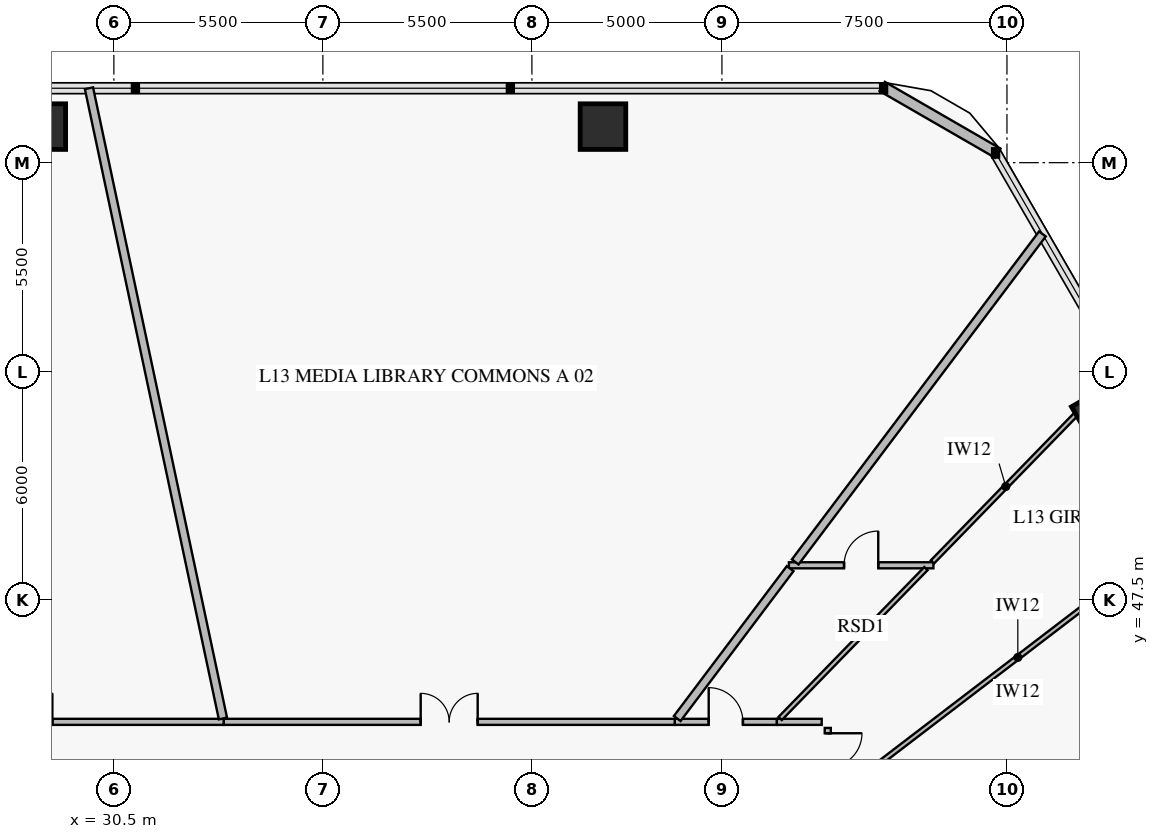
"""IFC4 building model, lengths in metres.
Left out: names, types, materials, properties, quantities, classifications, styles, units other than length and angle.
Written with IfcOpenShell. Run it as: python <this file> out.ifc"""

import sys

from ifc_helpers import new_model, si_unit, direction, frame, frame_2d, origin, origin_2d, place, context, subcontext, project, spatial, rectangle, extrude, element, fill, save


model = new_model("IFC4")
c1 = context("Model", 3, precision=1e-05, world=origin(), true_north=direction((0.0, 1.0)))
c2 = subcontext(c1, "Body", "Model", "MODEL_VIEW")
j1 = project(units=[si_unit("LENGTHUNIT", "METRE"), si_unit("PLANEANGLEUNIT", "RADIAN")], contexts=[c1])
p1 = place(None, origin())
s1 = spatial("IfcSite", under=j1, at=p1, CompositionType="ELEMENT")
p2 = place(p1, origin())
s2 = spatial("IfcBuilding", under=s1, at=p2, CompositionType="ELEMENT")
p3 = place(p2, frame((0.0, 0.0, 54.0)))
s3 = spatial("IfcBuildingStorey", under=s2, at=p3, CompositionType="ELEMENT", Elevation=54.0)
for number, where, z_axis, x_axis in (
    (1, (56.519, 52.357, 0.0), (0.0, 0.0, 1.0), (-0.5, 0.866, 0.0)),
    (2, (43.37, 59.948, 0.0), (0.0, 0.0, 1.0), (-1.0, 0.0, 0.0)),
    (3, (28.63, 59.948, 0.0), (0.0, 0.0, 1.0), (-1.0, 0.0, 0.0)),
):
    element("IfcColumn", number, at=place(p3, frame(where, z_axis=z_axis, x_axis=x_axis)), inside=s3, PredefinedType="COLUMN", context=c2, shape_type="SweptSolid", body=[
        extrude(rectangle(XDim=1.2, YDim=1.2, at=origin_2d()), origin(), (0.0, 0.0, 1.0), 3.92),
    ])
p4 = place(p3, frame((50.717, 61.006, 0.0), z_axis=(0.0, 0.0, 1.0), x_axis=(0.866007452331, -0.500031091541, 0.0)))
e4 = element("IfcWall", 4, at=p4, inside=s3, PredefinedType="SOLIDWALL", context=c2, shape_type="SweptSolid", body=[
    extrude(rectangle(XDim=3.515, YDim=0.28, at=frame_2d((1.757, 0.0))), origin(), (0.0, 0.0, 1.0), 3.92),
])
p5 = place(p3, frame((49.285, 42.157, 0.0), z_axis=(0.0, 0.0, 1.0), x_axis=(0.0, 1.0, 0.0)))
e5 = element("IfcWall", 5, at=p5, inside=s3, PredefinedType="PARTITIONING", context=c2, shape_type="SweptSolid", body=[
    extrude(rectangle(XDim=1.968, YDim=0.16, at=frame_2d((0.984, 0.0))), origin(), (0.0, 0.0, 1.0), 3.92),
])
p6 = place(p5, frame((0.928, 0.0, 0.0)))
e6 = element("IfcOpeningElement", 6, at=p6, cuts=e5, PredefinedType="OPENING", context=c2, shape_type="SweptSolid", body=[
    extrude(rectangle(XDim=0.9, YDim=2.1, at=frame_2d((0.45, 1.05))), frame((0.0, 0.092, 0.0), z_axis=(0.0, -1.0, 0.0), x_axis=(1.0, 0.0, 0.0)), (0.0, 0.0, 1.0), 0.184),
])
p7 = place(p3, frame((48.262, 48.405, 0.0), z_axis=(0.0, 0.0, 1.0), x_axis=(1.0, 0.0, 0.0)))
e7 = element("IfcWall", 7, at=p7, inside=s3, PredefinedType="PARTITIONING", context=c2, shape_type="SweptSolid", body=[
    extrude(rectangle(XDim=3.803, YDim=0.16, at=frame_2d((1.901, 0.0))), origin(), (0.0, 0.0, 1.0), 3.47),
])
p8 = place(p7, frame((1.451, 0.0, 0.0)))
e8 = element("IfcOpeningElement", 8, at=p8, cuts=e7, PredefinedType="OPENING", context=c2, shape_type="SweptSolid", body=[
    extrude(rectangle(XDim=0.9, YDim=2.1, at=frame_2d((0.45, 1.05))), frame((0.0, 0.092, 0.0), z_axis=(0.0, -1.0, 0.0), x_axis=(1.0, 0.0, 0.0)), (0.0, 0.0, 1.0), 0.184),
])
p9 = place(p3, frame((47.947, 44.285, 0.0), z_axis=(0.0, 0.0, 1.0), x_axis=(-1.0, 0.0, 0.0)))
e9 = element("IfcWall", 9, at=p9, inside=s3, PredefinedType="PARTITIONING", context=c2, shape_type="SweptSolid", body=[
    extrude(rectangle(XDim=2.689, YDim=0.16, at=frame_2d((1.345, 0.0))), origin(), (0.0, 0.0, 1.0), 3.92),
])
p10 = place(p9, frame((0.895, 0.0, 0.0)))
e10 = element("IfcOpeningElement", 10, at=p10, cuts=e9, PredefinedType="OPENING", context=c2, shape_type="SweptSolid", body=[
    extrude(rectangle(XDim=0.9, YDim=2.1, at=frame_2d((0.45, 1.05))), frame((0.0, 0.092, 0.0), z_axis=(0.0, -1.0, 0.0), x_axis=(1.0, 0.0, 0.0)), (0.0, 0.0, 1.0), 0.184),
])
p11 = place(p3, frame((45.257, 44.285, 0.0), z_axis=(0.0, 0.0, 1.0), x_axis=(-1.0, 0.0, 0.0)))
e11 = element("IfcWall", 11, at=p11, inside=s3, PredefinedType="PARTITIONING", context=c2, shape_type="SweptSolid", body=[
    extrude(rectangle(XDim=11.869, YDim=0.16, at=frame_2d((5.934, 0.0))), origin(), (0.0, 0.0, 1.0), 3.22),
])
p12 = place(p11, frame((5.184, 0.0, 0.0)))
e12 = element("IfcOpeningElement", 12, at=p12, cuts=e11, PredefinedType="OPENING", context=c2, shape_type="SweptSolid", body=[
    extrude(rectangle(XDim=1.5, YDim=2.15, at=frame_2d((0.75, 1.075))), frame((0.0, 0.092, 0.0), z_axis=(0.0, -1.0, 0.0), x_axis=(1.0, 0.0, 0.0)), (0.0, 0.0, 1.0), 0.184),
])
p13 = place(p3, frame((33.389, 44.285, 0.0), z_axis=(0.0, 0.0, 1.0), x_axis=(-1.0, 0.0, 0.0)))
e13 = element("IfcWall", 13, at=p13, inside=s3, PredefinedType="PARTITIONING", context=c2, shape_type="SweptSolid", body=[
    extrude(rectangle(XDim=10.514, YDim=0.16, at=frame_2d((5.257, 0.0))), origin(), (0.0, 0.0, 1.0), 3.22),
])
p14 = place(p13, frame((4.507, 0.0, 0.0)))
e14 = element("IfcOpeningElement", 14, at=p14, cuts=e13, PredefinedType="OPENING", context=c2, shape_type="SweptSolid", body=[
    extrude(rectangle(XDim=1.5, YDim=2.15, at=frame_2d((0.75, 1.075))), frame((0.0, 0.092, 0.0), z_axis=(0.0, -1.0, 0.0), x_axis=(1.0, 0.0, 0.0)), (0.0, 0.0, 1.0), 0.184),
])
p15 = place(p3, frame((49.373, 39.413, 0.0), z_axis=(0.0, 0.0, 1.0), x_axis=(0.874620963666, 0.484807353405, 0.0)))
e15 = element("IfcWall", 15, at=p15, inside=s3, PredefinedType="PARTITIONING", context=c2, shape_type="SweptSolid", body=[
    extrude(rectangle(XDim=13.673, YDim=0.22, at=frame_2d((6.836, 0.0))), origin(), (0.0, 0.0, 1.0), 3.17),
])
p16 = place(p3, frame((49.373, 42.225, 0.0), z_axis=(0.0, 0.0, 1.0), x_axis=(0.794422824401, 0.607365109362, 0.0)))
e16 = element("IfcWall", 16, at=p16, inside=s3, PredefinedType="PARTITIONING", context=c2, shape_type="SweptSolid", body=[
    extrude(rectangle(XDim=12.368, YDim=0.12, at=frame_2d((6.184, 0.0))), origin(), (0.0, 0.0, 1.0), 3.17),
])
p17 = place(p3, frame((49.125, 44.285, 0.0), z_axis=(0.0, 0.0, 1.0), x_axis=(-1.0, 0.0, 0.0)))
e17 = element("IfcWall", 17, at=p17, inside=s3, PredefinedType="PARTITIONING", context=c2, shape_type="SweptSolid", body=[
    extrude(rectangle(XDim=1.178, YDim=0.16, at=frame_2d((0.589, 0.0))), origin(), (0.0, 0.0, 1.0), 3.22),
])
p18 = place(p3, frame((48.032, 44.373, 0.0), z_axis=(0.0, 0.0, 1.0), x_axis=(0.697186119011, 0.716890169732, 0.0)))
e18 = element("IfcWall", 18, at=p18, inside=s3, PredefinedType="PARTITIONING", context=c2, shape_type="SweptSolid", body=[
    extrude(rectangle(XDim=5.501, YDim=0.12, at=frame_2d((2.75, 0.0))), origin(), (0.0, 0.0, 1.0), 3.47),
])
p19 = place(p3, frame((52.039, 48.493, 0.0), z_axis=(0.0, 0.0, 1.0), x_axis=(0.697138835877, 0.716936150234, 0.0)))
e19 = element("IfcWall", 19, at=p19, inside=s3, PredefinedType="PARTITIONING", context=c2, shape_type="SweptSolid", body=[
    extrude(rectangle(XDim=5.537, YDim=0.12, at=frame_2d((2.769, 0.0))), origin(), (0.0, 0.0, 1.0), 3.92),
])
p20 = place(p3, frame((45.324, 44.373, 0.0), z_axis=(0.0, 0.0, 1.0), x_axis=(0.601817794095, 0.798633421984, 0.0)))
e20 = element("IfcWall", 20, at=p20, inside=s3, PredefinedType="PARTITIONING", context=c2, shape_type="SweptSolid", body=[
    extrude(rectangle(XDim=4.938, YDim=0.22, at=frame_2d((2.469, 0.0))), origin(), (0.0, 0.0, 1.0), 3.92),
])
p21 = place(p3, frame((48.428, 48.493, 0.0), z_axis=(0.0, 0.0, 1.0), x_axis=(0.601802006389, 0.798645318715, 0.0)))
e21 = element("IfcWall", 21, at=p21, inside=s3, PredefinedType="PARTITIONING", context=c2, shape_type="SweptSolid", body=[
    extrude(rectangle(XDim=10.808, YDim=0.22, at=frame_2d((5.404, 0.0))), origin(), (0.0, 0.0, 1.0), 3.17),
])
p22 = place(p3, frame((33.37, 44.373, 0.0), z_axis=(0.0, 0.0, 1.0), x_axis=(-0.207914205497, 0.978147066219, 0.0)))
e22 = element("IfcWall", 22, at=p22, inside=s3, PredefinedType="PARTITIONING", context=c2, shape_type="SweptSolid", body=[
    extrude(rectangle(XDim=16.956, YDim=0.22, at=frame_2d((8.478, 0.0))), origin(), (0.0, 0.0, 1.0), 3.17),
])
p23 = place(p6, frame((0.9, 0.0, 0.0), z_axis=(0.0, 0.0, 1.0), x_axis=(-1.0, 0.0, 0.0)))
e23 = element("IfcDoor", 23, at=p23, inside=s3, OperationType="SINGLE_SWING_LEFT", PredefinedType="DOOR", context=c2, shape_type="SweptSolid", body=[
    extrude(rectangle(XDim=0.9, YDim=2.1, at=frame_2d((0.45, 1.05))), frame((0.0, 0.025, 0.0), z_axis=(0.0, -1.0, 0.0), x_axis=(1.0, 0.0, 0.0)), (0.0, 0.0, 1.0), 0.05),
])
fill(e6, e23)
p24 = place(p8, origin())
e24 = element("IfcDoor", 24, at=p24, inside=s3, OperationType="SINGLE_SWING_RIGHT", PredefinedType="DOOR", context=c2, shape_type="SweptSolid", body=[
    extrude(rectangle(XDim=0.9, YDim=2.1, at=frame_2d((0.45, 1.05))), frame((0.0, 0.025, 0.0), z_axis=(0.0, -1.0, 0.0), x_axis=(1.0, 0.0, 0.0)), (0.0, 0.0, 1.0), 0.05),
])
fill(e8, e24)
p25 = place(p10, frame((0.9, 0.0, 0.0), z_axis=(0.0, 0.0, 1.0), x_axis=(-1.0, 0.0, 0.0)))
e25 = element("IfcDoor", 25, at=p25, inside=s3, OperationType="SINGLE_SWING_LEFT", PredefinedType="DOOR", context=c2, shape_type="SweptSolid", body=[
    extrude(rectangle(XDim=0.9, YDim=2.1, at=frame_2d((0.45, 1.05))), frame((0.0, 0.025, 0.0), z_axis=(0.0, -1.0, 0.0), x_axis=(1.0, 0.0, 0.0)), (0.0, 0.0, 1.0), 0.05),
])
fill(e10, e25)
p26 = place(p12, frame((1.5, 0.0, 0.0), z_axis=(0.0, 0.0, 1.0), x_axis=(-1.0, 0.0, 0.0)))
e26 = element("IfcDoor", 26, at=p26, inside=s3, OperationType="DOUBLE_DOOR_SINGLE_SWING", PredefinedType="DOOR", context=c2, shape_type="SweptSolid", body=[
    extrude(rectangle(XDim=1.5, YDim=2.15, at=frame_2d((0.75, 1.075))), frame((0.0, 0.025, 0.0), z_axis=(0.0, -1.0, 0.0), x_axis=(1.0, 0.0, 0.0)), (0.0, 0.0, 1.0), 0.05),
])
fill(e12, e26)
p27 = place(p14, frame((1.5, 0.0, 0.0), z_axis=(0.0, 0.0, 1.0), x_axis=(-1.0, 0.0, 0.0)))
e27 = element("IfcDoor", 27, at=p27, inside=s3, OperationType="DOUBLE_DOOR_SINGLE_SWING", PredefinedType="DOOR", context=c2, shape_type="SweptSolid", body=[
    extrude(rectangle(XDim=1.5, YDim=2.15, at=frame_2d((0.75, 1.075))), frame((0.0, 0.025, 0.0), z_axis=(0.0, -1.0, 0.0), x_axis=(1.0, 0.0, 0.0)), (0.0, 0.0, 1.0), 0.05),
])
fill(e14, e27)
save(model, sys.argv[1])
